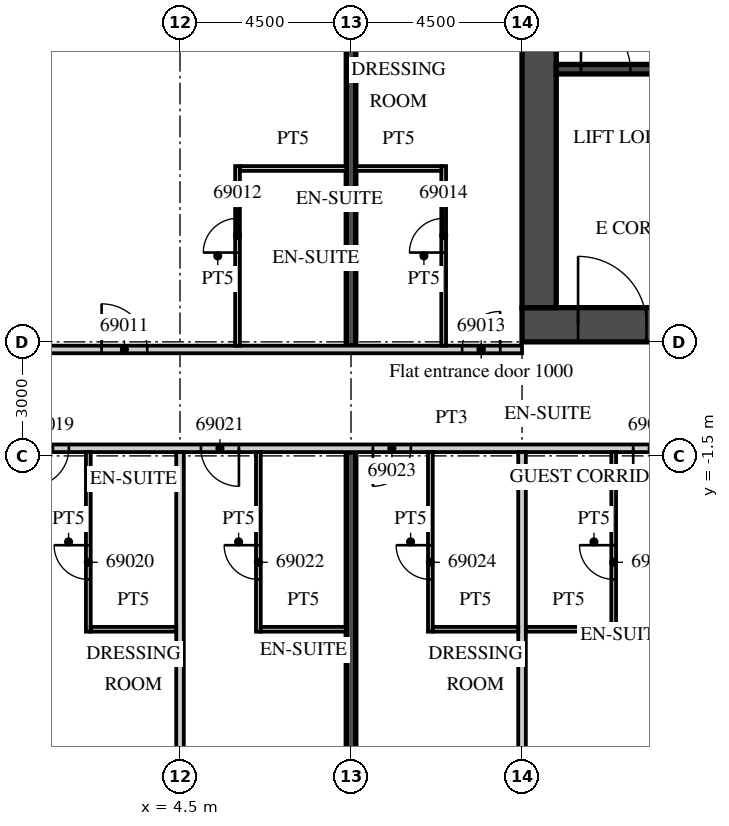
"""IFC4 building model, lengths in metres.
Left out: names, types, materials, properties, quantities, classifications, styles, units other than length and angle.
Written with IfcOpenShell. Run it as: python <this file> out.ifc"""

import sys

from ifc_helpers import new_model, si_unit, direction, frame, frame_2d, origin, place, context, subcontext, project, spatial, rectangle, extrude, element, fill, save


model = new_model("IFC4")
c1 = context("Model", 3, precision=1e-05, world=origin(), true_north=direction((0.0, 1.0)))
c2 = subcontext(c1, "Body", "Model", "MODEL_VIEW")
j1 = project(units=[si_unit("LENGTHUNIT", "METRE"), si_unit("PLANEANGLEUNIT", "RADIAN")], contexts=[c1])
p1 = place(None, origin())
s1 = spatial("IfcSite", under=j1, at=p1, CompositionType="ELEMENT")
p2 = place(p1, origin())
s2 = spatial("IfcBuilding", under=s1, at=p2, CompositionType="ELEMENT")
p3 = place(p2, frame((0.0, 0.0, 278.4)))
s3 = spatial("IfcBuildingStorey", under=s2, at=p3, CompositionType="ELEMENT", Elevation=278.4)
p4 = place(p3, frame((9.0, -19.207, 0.0), z_axis=(0.0, 0.0, 1.0), x_axis=(0.0, 1.0, 0.0)))
e1 = element("IfcWall", 1, at=p4, inside=s3, PredefinedType="SHEAR", context=c2, shape_type="SweptSolid", body=[
    extrude(rectangle(XDim=17.807, YDim=0.25, at=frame_2d((8.904, 0.0))), origin(), (0.0, 0.0, 1.0), 3.3),
])
p5 = place(p3, frame((9.0, 1.4, 0.0), z_axis=(0.0, 0.0, 1.0), x_axis=(0.0, 1.0, 0.0)))
e2 = element("IfcWall", 2, at=p5, inside=s3, PredefinedType="SHEAR", context=c2, shape_type="SweptSolid", body=[
    extrude(rectangle(XDim=18.629, YDim=0.25, at=frame_2d((9.315, 0.0))), origin(), (0.0, 0.0, 1.0), 3.3),
])
p6 = place(p3, frame((-39.909, 1.3, 0.0), z_axis=(0.0, 0.0, 1.0), x_axis=(1.0, 0.0, 0.0)))
e3 = element("IfcWall", 3, at=p6, inside=s3, PredefinedType="PARTITIONING", context=c2, shape_type="SweptSolid", body=[
    extrude(rectangle(XDim=53.409, YDim=0.2, at=frame_2d((26.705, 0.0))), origin(), (0.0, 0.0, 1.0), 3.02),
])
p7 = place(p6, frame((0.15, 0.0, 0.0)))
e4 = element("IfcOpeningElement", 4, at=p7, cuts=e3, PredefinedType="OPENING", context=c2, shape_type="SweptSolid", body=[
    extrude(rectangle(XDim=0.9, YDim=2.1, at=frame_2d((0.45, 1.05))), frame((0.0, 0.11, 0.0), z_axis=(0.0, -1.0, 0.0), x_axis=(1.0, 0.0, 0.0)), (0.0, 0.0, 1.0), 0.22),
])
p8 = place(p6, frame((6.347, 0.0, 0.0)))
e5 = element("IfcOpeningElement", 5, at=p8, cuts=e3, PredefinedType="OPENING", context=c2, shape_type="SweptSolid", body=[
    extrude(rectangle(XDim=1.2, YDim=2.1, at=frame_2d((0.6, 1.05))), frame((0.0, 0.11, 0.0), z_axis=(0.0, -1.0, 0.0), x_axis=(1.0, 0.0, 0.0)), (0.0, 0.0, 1.0), 0.22),
])
p9 = place(p6, frame((15.347, 0.0, 0.0)))
e6 = element("IfcOpeningElement", 6, at=p9, cuts=e3, PredefinedType="OPENING", context=c2, shape_type="SweptSolid", body=[
    extrude(rectangle(XDim=1.2, YDim=2.1, at=frame_2d((0.6, 1.05))), frame((0.0, 0.11, 0.0), z_axis=(0.0, -1.0, 0.0), x_axis=(1.0, 0.0, 0.0)), (0.0, 0.0, 1.0), 0.22),
])
p10 = place(p6, frame((24.346, 0.0, 0.0)))
e7 = element("IfcOpeningElement", 7, at=p10, cuts=e3, PredefinedType="OPENING", context=c2, shape_type="SweptSolid", body=[
    extrude(rectangle(XDim=1.2, YDim=2.1, at=frame_2d((0.6, 1.05))), frame((0.0, 0.11, 0.0), z_axis=(0.0, -1.0, 0.0), x_axis=(1.0, 0.0, 0.0)), (0.0, 0.0, 1.0), 0.22),
])
p11 = place(p6, frame((33.346, 0.0, 0.0)))
e8 = element("IfcOpeningElement", 8, at=p11, cuts=e3, PredefinedType="OPENING", context=c2, shape_type="SweptSolid", body=[
    extrude(rectangle(XDim=1.2, YDim=2.1, at=frame_2d((0.6, 1.05))), frame((0.0, 0.11, 0.0), z_axis=(0.0, -1.0, 0.0), x_axis=(1.0, 0.0, 0.0)), (0.0, 0.0, 1.0), 0.22),
])
p12 = place(p6, frame((42.346, 0.0, 0.0)))
e9 = element("IfcOpeningElement", 9, at=p12, cuts=e3, PredefinedType="OPENING", context=c2, shape_type="SweptSolid", body=[
    extrude(rectangle(XDim=1.2, YDim=2.1, at=frame_2d((0.6, 1.05))), frame((0.0, 0.11, 0.0), z_axis=(0.0, -1.0, 0.0), x_axis=(1.0, 0.0, 0.0)), (0.0, 0.0, 1.0), 0.22),
])
p13 = place(p6, frame((51.834, 0.0, 0.0)))
e10 = element("IfcOpeningElement", 10, at=p13, cuts=e3, PredefinedType="OPENING", context=c2, shape_type="SweptSolid", body=[
    extrude(rectangle(XDim=1.0, YDim=2.1, at=frame_2d((0.5, 1.05))), frame((0.0, 0.11, 0.0), z_axis=(0.0, -1.0, 0.0), x_axis=(1.0, 0.0, 0.0)), (0.0, 0.0, 1.0), 0.22),
])
p14 = place(p3, frame((6.013, 1.4, 0.0), z_axis=(0.0, 0.0, 1.0), x_axis=(0.0, 1.0, 0.0)))
e11 = element("IfcWall", 11, at=p14, inside=s3, PredefinedType="PARTITIONING", context=c2, shape_type="SweptSolid", body=[
    extrude(rectangle(XDim=4.725, YDim=0.125, at=frame_2d((2.363, 0.0))), origin(), (0.0, 0.0, 1.0), 3.02),
])
p15 = place(p14, frame((2.45, 0.0, 0.0)))
e12 = element("IfcOpeningElement", 12, at=p15, cuts=e11, PredefinedType="OPENING", context=c2, shape_type="SweptSolid", body=[
    extrude(rectangle(XDim=0.9, YDim=2.1, at=frame_2d((0.45, 1.05))), frame((0.0, 0.073, 0.0), z_axis=(0.0, -1.0, 0.0), x_axis=(1.0, 0.0, 0.0)), (0.0, 0.0, 1.0), 0.145),
])
p16 = place(p3, frame((6.075, 6.062, 0.0), z_axis=(0.0, 0.0, 1.0), x_axis=(1.0, 0.0, 0.0)))
e13 = element("IfcWall", 13, at=p16, inside=s3, PredefinedType="PARTITIONING", context=c2, shape_type="SweptSolid", body=[
    extrude(rectangle(XDim=2.8, YDim=0.125, at=frame_2d((1.4, 0.0))), origin(), (0.0, 0.0, 1.0), 3.02),
])
p17 = place(p3, frame((11.438, 1.4, 0.0), z_axis=(0.0, 0.0, 1.0), x_axis=(0.0, 1.0, 0.0)))
e14 = element("IfcWall", 14, at=p17, inside=s3, PredefinedType="PARTITIONING", context=c2, shape_type="SweptSolid", body=[
    extrude(rectangle(XDim=4.725, YDim=0.125, at=frame_2d((2.363, 0.0))), origin(), (0.0, 0.0, 1.0), 3.02),
])
p18 = place(p17, frame((2.45, 0.0, 0.0)))
e15 = element("IfcOpeningElement", 15, at=p18, cuts=e14, PredefinedType="OPENING", context=c2, shape_type="SweptSolid", body=[
    extrude(rectangle(XDim=0.9, YDim=2.1, at=frame_2d((0.45, 1.05))), frame((0.0, 0.073, 0.0), z_axis=(0.0, -1.0, 0.0), x_axis=(1.0, 0.0, 0.0)), (0.0, 0.0, 1.0), 0.145),
])
p19 = place(p3, frame((9.125, 6.062, 0.0), z_axis=(0.0, 0.0, 1.0), x_axis=(1.0, 0.0, 0.0)))
e16 = element("IfcWall", 16, at=p19, inside=s3, PredefinedType="PARTITIONING", context=c2, shape_type="SweptSolid", body=[
    extrude(rectangle(XDim=2.25, YDim=0.125, at=frame_2d((1.125, 0.0))), origin(), (0.0, 0.0, 1.0), 3.02),
])
p20 = place(p3, frame((-13.5, -1.3, 0.0), z_axis=(0.0, 0.0, 1.0), x_axis=(1.0, 0.0, 0.0)))
e17 = element("IfcWall", 17, at=p20, inside=s3, PredefinedType="PARTITIONING", context=c2, shape_type="SweptSolid", body=[
    extrude(rectangle(XDim=50.293, YDim=0.2, at=frame_2d((25.146, 0.0))), origin(), (0.0, 0.0, 1.0), 3.02),
])
p21 = place(p20, frame((2.925, 0.0, 0.0)))
e18 = element("IfcOpeningElement", 18, at=p21, cuts=e17, PredefinedType="OPENING", context=c2, shape_type="SweptSolid", body=[
    extrude(rectangle(XDim=1.0, YDim=2.1, at=frame_2d((0.5, 1.05))), frame((0.0, 0.11, 0.0), z_axis=(0.0, -1.0, 0.0), x_axis=(1.0, 0.0, 0.0)), (0.0, 0.0, 1.0), 0.22),
])
p22 = place(p20, frame((6.938, 0.0, 0.0)))
e19 = element("IfcOpeningElement", 19, at=p22, cuts=e17, PredefinedType="OPENING", context=c2, shape_type="SweptSolid", body=[
    extrude(rectangle(XDim=1.2, YDim=2.1, at=frame_2d((0.6, 1.05))), frame((0.0, 0.11, 0.0), z_axis=(0.0, -1.0, 0.0), x_axis=(1.0, 0.0, 0.0)), (0.0, 0.0, 1.0), 0.22),
])
p23 = place(p20, frame((14.075, 0.0, 0.0)))
e20 = element("IfcOpeningElement", 20, at=p23, cuts=e17, PredefinedType="OPENING", context=c2, shape_type="SweptSolid", body=[
    extrude(rectangle(XDim=1.0, YDim=2.1, at=frame_2d((0.5, 1.05))), frame((0.0, 0.11, 0.0), z_axis=(0.0, -1.0, 0.0), x_axis=(1.0, 0.0, 0.0)), (0.0, 0.0, 1.0), 0.22),
])
p24 = place(p20, frame((18.55, 0.0, 0.0)))
e21 = element("IfcOpeningElement", 21, at=p24, cuts=e17, PredefinedType="OPENING", context=c2, shape_type="SweptSolid", body=[
    extrude(rectangle(XDim=1.0, YDim=2.1, at=frame_2d((0.5, 1.05))), frame((0.0, 0.11, 0.0), z_axis=(0.0, -1.0, 0.0), x_axis=(1.0, 0.0, 0.0)), (0.0, 0.0, 1.0), 0.22),
])
p25 = place(p20, frame((23.075, 0.0, 0.0)))
e22 = element("IfcOpeningElement", 22, at=p25, cuts=e17, PredefinedType="OPENING", context=c2, shape_type="SweptSolid", body=[
    extrude(rectangle(XDim=1.0, YDim=2.1, at=frame_2d((0.5, 1.05))), frame((0.0, 0.11, 0.0), z_axis=(0.0, -1.0, 0.0), x_axis=(1.0, 0.0, 0.0)), (0.0, 0.0, 1.0), 0.22),
])
p26 = place(p20, frame((29.925, 0.0, 0.0)))
e23 = element("IfcOpeningElement", 23, at=p26, cuts=e17, PredefinedType="OPENING", context=c2, shape_type="SweptSolid", body=[
    extrude(rectangle(XDim=1.0, YDim=2.1, at=frame_2d((0.5, 1.05))), frame((0.0, 0.11, 0.0), z_axis=(0.0, -1.0, 0.0), x_axis=(1.0, 0.0, 0.0)), (0.0, 0.0, 1.0), 0.22),
])
p27 = place(p20, frame((32.075, 0.0, 0.0)))
e24 = element("IfcOpeningElement", 24, at=p27, cuts=e17, PredefinedType="OPENING", context=c2, shape_type="SweptSolid", body=[
    extrude(rectangle(XDim=1.0, YDim=2.1, at=frame_2d((0.5, 1.05))), frame((0.0, 0.11, 0.0), z_axis=(0.0, -1.0, 0.0), x_axis=(1.0, 0.0, 0.0)), (0.0, 0.0, 1.0), 0.22),
])
p28 = place(p20, frame((36.55, 0.0, 0.0)))
e25 = element("IfcOpeningElement", 25, at=p28, cuts=e17, PredefinedType="OPENING", context=c2, shape_type="SweptSolid", body=[
    extrude(rectangle(XDim=1.0, YDim=2.1, at=frame_2d((0.5, 1.05))), frame((0.0, 0.11, 0.0), z_axis=(0.0, -1.0, 0.0), x_axis=(1.0, 0.0, 0.0)), (0.0, 0.0, 1.0), 0.22),
])
p29 = place(p20, frame((42.938, 0.0, 0.0)))
e26 = element("IfcOpeningElement", 26, at=p29, cuts=e17, PredefinedType="OPENING", context=c2, shape_type="SweptSolid", body=[
    extrude(rectangle(XDim=1.2, YDim=2.1, at=frame_2d((0.6, 1.05))), frame((0.0, 0.11, 0.0), z_axis=(0.0, -1.0, 0.0), x_axis=(1.0, 0.0, 0.0)), (0.0, 0.0, 1.0), 0.22),
])
p30 = place(p3, frame((4.5, -19.663, 0.0), z_axis=(0.0, 0.0, 1.0), x_axis=(0.0, 1.0, 0.0)))
e27 = element("IfcWall", 27, at=p30, inside=s3, PredefinedType="PARTITIONING", context=c2, shape_type="SweptSolid", body=[
    extrude(rectangle(XDim=18.263, YDim=0.2, at=frame_2d((9.132, 0.0))), origin(), (0.0, 0.0, 1.0), 3.02),
])
p31 = place(p3, frame((2.087, -6.125, 0.0), z_axis=(0.0, 0.0, 1.0), x_axis=(0.0, 1.0, 0.0)))
e28 = element("IfcWall", 28, at=p31, inside=s3, PredefinedType="PARTITIONING", context=c2, shape_type="SweptSolid", body=[
    extrude(rectangle(XDim=4.725, YDim=0.125, at=frame_2d((2.363, 0.0))), origin(), (0.0, 0.0, 1.0), 3.02),
])
p32 = place(p31, frame((1.375, 0.0, 0.0)))
e29 = element("IfcOpeningElement", 29, at=p32, cuts=e28, PredefinedType="OPENING", context=c2, shape_type="SweptSolid", body=[
    extrude(rectangle(XDim=0.9, YDim=2.1, at=frame_2d((0.45, 1.05))), frame((0.0, 0.073, 0.0), z_axis=(0.0, -1.0, 0.0), x_axis=(1.0, 0.0, 0.0)), (0.0, 0.0, 1.0), 0.145),
])
p33 = place(p3, frame((2.15, -6.062, 0.0), z_axis=(0.0, 0.0, 1.0), x_axis=(1.0, 0.0, 0.0)))
e30 = element("IfcWall", 30, at=p33, inside=s3, PredefinedType="PARTITIONING", context=c2, shape_type="SweptSolid", body=[
    extrude(rectangle(XDim=2.25, YDim=0.125, at=frame_2d((1.125, 0.0))), origin(), (0.0, 0.0, 1.0), 3.02),
])
p34 = place(p3, frame((6.562, -6.125, 0.0), z_axis=(0.0, 0.0, 1.0), x_axis=(0.0, 1.0, 0.0)))
e31 = element("IfcWall", 31, at=p34, inside=s3, PredefinedType="PARTITIONING", context=c2, shape_type="SweptSolid", body=[
    extrude(rectangle(XDim=4.725, YDim=0.125, at=frame_2d((2.363, 0.0))), origin(), (0.0, 0.0, 1.0), 3.02),
])
p35 = place(p34, frame((1.375, 0.0, 0.0)))
e32 = element("IfcOpeningElement", 32, at=p35, cuts=e31, PredefinedType="OPENING", context=c2, shape_type="SweptSolid", body=[
    extrude(rectangle(XDim=0.9, YDim=2.1, at=frame_2d((0.45, 1.05))), frame((0.0, 0.073, 0.0), z_axis=(0.0, -1.0, 0.0), x_axis=(1.0, 0.0, 0.0)), (0.0, 0.0, 1.0), 0.145),
])
p36 = place(p3, frame((6.625, -6.062, 0.0), z_axis=(0.0, 0.0, 1.0), x_axis=(1.0, 0.0, 0.0)))
e33 = element("IfcWall", 33, at=p36, inside=s3, PredefinedType="PARTITIONING", context=c2, shape_type="SweptSolid", body=[
    extrude(rectangle(XDim=2.25, YDim=0.125, at=frame_2d((1.125, 0.0))), origin(), (0.0, 0.0, 1.0), 3.02),
])
p37 = place(p3, frame((13.5, -18.796, 0.0), z_axis=(0.0, 0.0, 1.0), x_axis=(0.0, 1.0, 0.0)))
e34 = element("IfcWall", 34, at=p37, inside=s3, PredefinedType="PARTITIONING", context=c2, shape_type="SweptSolid", body=[
    extrude(rectangle(XDim=17.396, YDim=0.2, at=frame_2d((8.698, 0.0))), origin(), (0.0, 0.0, 1.0), 3.02),
])
p38 = place(p3, frame((11.088, -6.125, 0.0), z_axis=(0.0, 0.0, 1.0), x_axis=(0.0, 1.0, 0.0)))
e35 = element("IfcWall", 35, at=p38, inside=s3, PredefinedType="PARTITIONING", context=c2, shape_type="SweptSolid", body=[
    extrude(rectangle(XDim=4.725, YDim=0.125, at=frame_2d((2.363, 0.0))), origin(), (0.0, 0.0, 1.0), 3.02),
])
p39 = place(p38, frame((1.375, 0.0, 0.0)))
e36 = element("IfcOpeningElement", 36, at=p39, cuts=e35, PredefinedType="OPENING", context=c2, shape_type="SweptSolid", body=[
    extrude(rectangle(XDim=0.9, YDim=2.1, at=frame_2d((0.45, 1.05))), frame((0.0, 0.073, 0.0), z_axis=(0.0, -1.0, 0.0), x_axis=(1.0, 0.0, 0.0)), (0.0, 0.0, 1.0), 0.145),
])
p40 = place(p3, frame((11.15, -6.062, 0.0), z_axis=(0.0, 0.0, 1.0), x_axis=(1.0, 0.0, 0.0)))
e37 = element("IfcWall", 37, at=p40, inside=s3, PredefinedType="PARTITIONING", context=c2, shape_type="SweptSolid", body=[
    extrude(rectangle(XDim=2.25, YDim=0.125, at=frame_2d((1.125, 0.0))), origin(), (0.0, 0.0, 1.0), 3.02),
])
p41 = place(p3, frame((15.912, -6.125, 0.0), z_axis=(0.0, 0.0, 1.0), x_axis=(0.0, 1.0, 0.0)))
e38 = element("IfcWall", 38, at=p41, inside=s3, PredefinedType="PARTITIONING", context=c2, shape_type="SweptSolid", body=[
    extrude(rectangle(XDim=4.725, YDim=0.125, at=frame_2d((2.363, 0.0))), origin(), (0.0, 0.0, 1.0), 3.02),
])
p42 = place(p41, frame((1.375, 0.0, 0.0)))
e39 = element("IfcOpeningElement", 39, at=p42, cuts=e38, PredefinedType="OPENING", context=c2, shape_type="SweptSolid", body=[
    extrude(rectangle(XDim=0.9, YDim=2.1, at=frame_2d((0.45, 1.05))), frame((0.0, 0.073, 0.0), z_axis=(0.0, -1.0, 0.0), x_axis=(1.0, 0.0, 0.0)), (0.0, 0.0, 1.0), 0.145),
])
p43 = place(p3, frame((13.6, -6.062, 0.0), z_axis=(0.0, 0.0, 1.0), x_axis=(1.0, 0.0, 0.0)))
e40 = element("IfcWall", 40, at=p43, inside=s3, PredefinedType="PARTITIONING", context=c2, shape_type="SweptSolid", body=[
    extrude(rectangle(XDim=2.25, YDim=0.125, at=frame_2d((1.125, 0.0))), origin(), (0.0, 0.0, 1.0), 3.02),
])
p44 = place(p3, frame((13.5, 1.95, 0.0), z_axis=(0.0, 0.0, 1.0), x_axis=(1.0, 0.0, 0.0)))
e41 = element("IfcWall", 41, at=p44, inside=s3, PredefinedType="SHEAR", context=c2, shape_type="SweptSolid", body=[
    extrude(rectangle(XDim=18.0, YDim=0.9, at=frame_2d((9.0, 0.0))), origin(), (0.0, 0.0, 1.0), 3.02),
])
p45 = place(p44, frame((1.475, 0.0, 0.0)))
e42 = element("IfcOpeningElement", 42, at=p45, cuts=e41, PredefinedType="OPENING", context=c2, shape_type="SweptSolid", body=[
    extrude(rectangle(XDim=1.8, YDim=2.1, at=frame_2d((0.9, 1.05))), frame((0.0, 0.46, 0.0), z_axis=(0.0, -1.0, 0.0), x_axis=(1.0, 0.0, 0.0)), (0.0, 0.0, 1.0), 0.92),
])
p46 = place(p3, frame((13.95, 2.4, 0.0), z_axis=(0.0, 0.0, 1.0), x_axis=(0.0, 1.0, 0.0)))
e43 = element("IfcWall", 43, at=p46, inside=s3, PredefinedType="SHEAR", context=c2, shape_type="SweptSolid", body=[
    extrude(rectangle(XDim=12.2, YDim=0.9, at=frame_2d((6.1, 0.0))), origin(), (0.0, 0.0, 1.0), 3.02),
])
p47 = place(p3, frame((14.4, 8.675, 0.0), z_axis=(0.0, 0.0, 1.0), x_axis=(1.0, 0.0, 0.0)))
e44 = element("IfcWall", 44, at=p47, inside=s3, PredefinedType="SHEAR", context=c2, shape_type="SweptSolid", body=[
    extrude(rectangle(XDim=16.2, YDim=0.25, at=frame_2d((8.1, 0.0))), origin(), (0.0, 0.0, 1.0), 3.02),
])
p48 = place(p47, frame((0.65, 0.0, 0.0)))
e45 = element("IfcOpeningElement", 45, at=p48, cuts=e44, PredefinedType="OPENING", context=c2, shape_type="SweptSolid", body=[
    extrude(rectangle(XDim=1.3, YDim=2.1, at=frame_2d((0.65, 1.05))), frame((0.0, 0.135, 0.0), z_axis=(0.0, -1.0, 0.0), x_axis=(1.0, 0.0, 0.0)), (0.0, 0.0, 1.0), 0.27),
])
p49 = place(p47, frame((12.962, 0.0, 0.0)))
e46 = element("IfcOpeningElement", 46, at=p49, cuts=e44, PredefinedType="OPENING", context=c2, shape_type="SweptSolid", body=[
    extrude(rectangle(XDim=1.0, YDim=2.1, at=frame_2d((0.5, 1.05))), frame((0.0, 0.135, 0.0), z_axis=(0.0, -1.0, 0.0), x_axis=(1.0, 0.0, 0.0)), (0.0, 0.0, 1.0), 0.27),
])
p50 = place(p47, frame((8.1, 0.0, 0.0)))
e47 = element("IfcOpeningElement", 47, at=p50, cuts=e44, PredefinedType="OPENING", context=c2, shape_type="SweptSolid", body=[
    extrude(rectangle(XDim=1.0, YDim=2.1, at=frame_2d((0.5, 1.05))), frame((0.0, 0.135, 0.0), z_axis=(0.0, -1.0, 0.0), x_axis=(1.0, 0.0, 0.0)), (0.0, 0.0, 1.0), 0.27),
])
p51 = place(p47, frame((4.212, 0.0, 0.0)))
e48 = element("IfcOpeningElement", 48, at=p51, cuts=e44, PredefinedType="OPENING", context=c2, shape_type="SweptSolid", body=[
    extrude(rectangle(XDim=1.0, YDim=2.1, at=frame_2d((0.5, 1.05))), frame((0.0, 0.135, 0.0), z_axis=(0.0, -1.0, 0.0), x_axis=(1.0, 0.0, 0.0)), (0.0, 0.0, 1.0), 0.27),
])
p52 = place(p12, origin())
e49 = element("IfcDoor", 49, at=p52, inside=s3, OperationType="SINGLE_SWING_LEFT", PredefinedType="DOOR", context=c2, shape_type="SweptSolid", body=[
    extrude(rectangle(XDim=1.2, YDim=2.1, at=frame_2d((0.6, 1.05))), frame((0.0, 0.025, 0.0), z_axis=(0.0, -1.0, 0.0), x_axis=(1.0, 0.0, 0.0)), (0.0, 0.0, 1.0), 0.05),
])
fill(e9, e49)
p53 = place(p15, origin())
e50 = element("IfcDoor", 50, at=p53, inside=s3, OperationType="SINGLE_SWING_LEFT", PredefinedType="DOOR", context=c2, shape_type="SweptSolid", body=[
    extrude(rectangle(XDim=0.9, YDim=2.1, at=frame_2d((0.45, 1.05))), frame((0.0, 0.025, 0.0), z_axis=(0.0, -1.0, 0.0), x_axis=(1.0, 0.0, 0.0)), (0.0, 0.0, 1.0), 0.05),
])
fill(e12, e50)
p54 = place(p13, origin())
e51 = element("IfcDoor", 51, at=p54, inside=s3, OperationType="SINGLE_SWING_RIGHT", PredefinedType="DOOR", context=c2, shape_type="SweptSolid", body=[
    extrude(rectangle(XDim=1.0, YDim=2.1, at=frame_2d((0.5, 1.05))), frame((0.0, 0.025, 0.0), z_axis=(0.0, -1.0, 0.0), x_axis=(1.0, 0.0, 0.0)), (0.0, 0.0, 1.0), 0.05),
])
fill(e10, e51)
p55 = place(p18, origin())
e52 = element("IfcDoor", 52, at=p55, inside=s3, OperationType="SINGLE_SWING_LEFT", PredefinedType="DOOR", context=c2, shape_type="SweptSolid", body=[
    extrude(rectangle(XDim=0.9, YDim=2.1, at=frame_2d((0.45, 1.05))), frame((0.0, 0.025, 0.0), z_axis=(0.0, -1.0, 0.0), x_axis=(1.0, 0.0, 0.0)), (0.0, 0.0, 1.0), 0.05),
])
fill(e15, e52)
p56 = place(p23, origin())
e53 = element("IfcDoor", 53, at=p56, inside=s3, OperationType="SINGLE_SWING_LEFT", PredefinedType="DOOR", context=c2, shape_type="SweptSolid", body=[
    extrude(rectangle(XDim=1.0, YDim=2.1, at=frame_2d((0.5, 1.05))), frame((0.0, 0.025, 0.0), z_axis=(0.0, -1.0, 0.0), x_axis=(1.0, 0.0, 0.0)), (0.0, 0.0, 1.0), 0.05),
])
fill(e20, e53)
p57 = place(p32, origin())
e54 = element("IfcDoor", 54, at=p57, inside=s3, OperationType="SINGLE_SWING_RIGHT", PredefinedType="DOOR", context=c2, shape_type="SweptSolid", body=[
    extrude(rectangle(XDim=0.9, YDim=2.1, at=frame_2d((0.45, 1.05))), frame((0.0, 0.025, 0.0), z_axis=(0.0, -1.0, 0.0), x_axis=(1.0, 0.0, 0.0)), (0.0, 0.0, 1.0), 0.05),
])
fill(e29, e54)
p58 = place(p24, origin())
e55 = element("IfcDoor", 55, at=p58, inside=s3, OperationType="SINGLE_SWING_RIGHT", PredefinedType="DOOR", context=c2, shape_type="SweptSolid", body=[
    extrude(rectangle(XDim=1.0, YDim=2.1, at=frame_2d((0.5, 1.05))), frame((0.0, 0.025, 0.0), z_axis=(0.0, -1.0, 0.0), x_axis=(1.0, 0.0, 0.0)), (0.0, 0.0, 1.0), 0.05),
])
fill(e21, e55)
p59 = place(p35, origin())
e56 = element("IfcDoor", 56, at=p59, inside=s3, OperationType="SINGLE_SWING_RIGHT", PredefinedType="DOOR", context=c2, shape_type="SweptSolid", body=[
    extrude(rectangle(XDim=0.9, YDim=2.1, at=frame_2d((0.45, 1.05))), frame((0.0, 0.025, 0.0), z_axis=(0.0, -1.0, 0.0), x_axis=(1.0, 0.0, 0.0)), (0.0, 0.0, 1.0), 0.05),
])
fill(e32, e56)
p60 = place(p25, origin())
e57 = element("IfcDoor", 57, at=p60, inside=s3, OperationType="SINGLE_SWING_LEFT", PredefinedType="DOOR", context=c2, shape_type="SweptSolid", body=[
    extrude(rectangle(XDim=1.0, YDim=2.1, at=frame_2d((0.5, 1.05))), frame((0.0, 0.025, 0.0), z_axis=(0.0, -1.0, 0.0), x_axis=(1.0, 0.0, 0.0)), (0.0, 0.0, 1.0), 0.05),
])
fill(e22, e57)
p61 = place(p39, origin())
e58 = element("IfcDoor", 58, at=p61, inside=s3, OperationType="SINGLE_SWING_RIGHT", PredefinedType="DOOR", context=c2, shape_type="SweptSolid", body=[
    extrude(rectangle(XDim=0.9, YDim=2.1, at=frame_2d((0.45, 1.05))), frame((0.0, 0.025, 0.0), z_axis=(0.0, -1.0, 0.0), x_axis=(1.0, 0.0, 0.0)), (0.0, 0.0, 1.0), 0.05),
])
fill(e36, e58)
p62 = place(p26, origin())
e59 = element("IfcDoor", 59, at=p62, inside=s3, OperationType="SINGLE_SWING_LEFT", PredefinedType="DOOR", context=c2, shape_type="SweptSolid", body=[
    extrude(rectangle(XDim=1.0, YDim=2.1, at=frame_2d((0.5, 1.05))), frame((0.0, 0.025, 0.0), z_axis=(0.0, -1.0, 0.0), x_axis=(1.0, 0.0, 0.0)), (0.0, 0.0, 1.0), 0.05),
])
fill(e23, e59)
p63 = place(p42, origin())
e60 = element("IfcDoor", 60, at=p63, inside=s3, OperationType="SINGLE_SWING_RIGHT", PredefinedType="DOOR", context=c2, shape_type="SweptSolid", body=[
    extrude(rectangle(XDim=0.9, YDim=2.1, at=frame_2d((0.45, 1.05))), frame((0.0, 0.025, 0.0), z_axis=(0.0, -1.0, 0.0), x_axis=(1.0, 0.0, 0.0)), (0.0, 0.0, 1.0), 0.05),
])
fill(e39, e60)
p64 = place(p45, origin())
e61 = element("IfcDoor", 61, at=p64, inside=s3, OperationType="DOUBLE_DOOR_DOUBLE_SWING", PredefinedType="DOOR", context=c2, shape_type="SweptSolid", body=[
    extrude(rectangle(XDim=1.8, YDim=2.1, at=frame_2d((0.9, 1.05))), frame((0.0, 0.025, 0.0), z_axis=(0.0, -1.0, 0.0), x_axis=(1.0, 0.0, 0.0)), (0.0, 0.0, 1.0), 0.05),
])
fill(e42, e61)
p65 = place(p48, origin())
e62 = element("IfcDoor", 62, at=p65, inside=s3, OperationType="SINGLE_SWING_LEFT", PredefinedType="DOOR", context=c2, shape_type="SweptSolid", body=[
    extrude(rectangle(XDim=1.3, YDim=2.1, at=frame_2d((0.65, 1.05))), frame((0.0, 0.025, 0.0), z_axis=(0.0, -1.0, 0.0), x_axis=(1.0, 0.0, 0.0)), (0.0, 0.0, 1.0), 0.05),
])
fill(e45, e62)
save(model, sys.argv[1])
